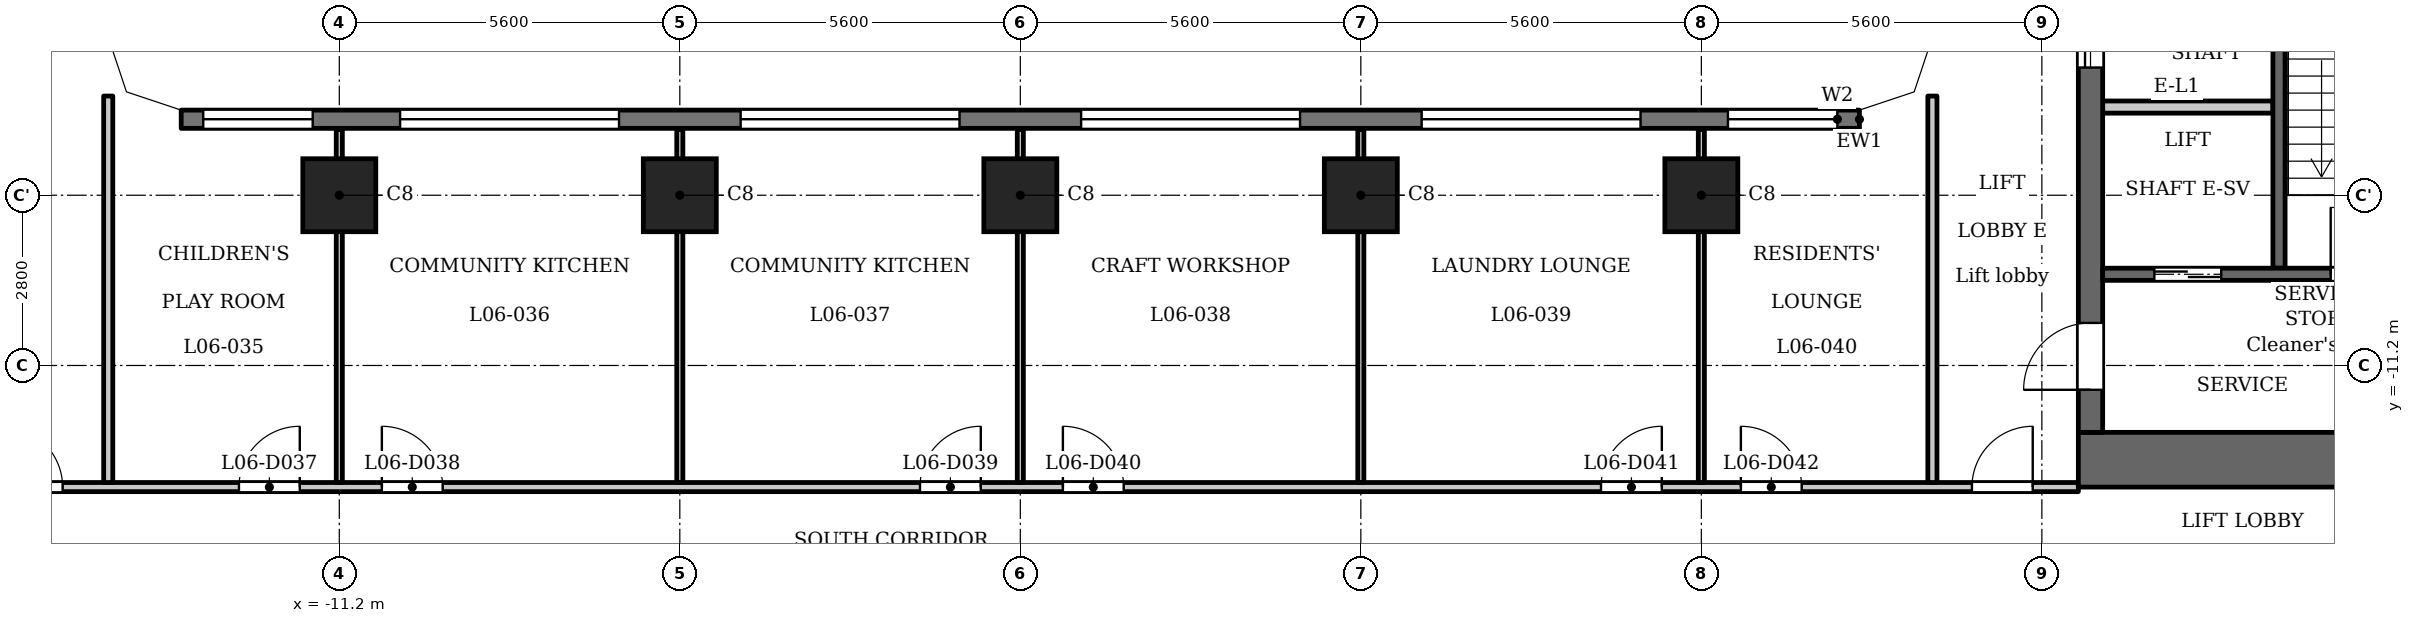
"""IFC4 building model, lengths in metres.
Left out: names, types, materials, properties, quantities, classifications, styles, units other than length and angle.
Written with IfcOpenShell. Run it as: python <this file> out.ifc"""

import sys

from ifc_helpers import new_model, si_unit, direction, frame, frame_2d, origin, origin_2d, place, context, subcontext, project, spatial, polyline, rectangle, outline, extrude, element, fill, save


model = new_model("IFC4")
c1 = context("Model", 3, precision=1e-05, world=origin(), true_north=direction((0.0, 1.0)))
c2 = subcontext(c1, "Body", "Model", "MODEL_VIEW")
j1 = project(units=[si_unit("LENGTHUNIT", "METRE"), si_unit("PLANEANGLEUNIT", "RADIAN")], contexts=[c1])
p1 = place(None, origin())
s1 = spatial("IfcSite", under=j1, at=p1, CompositionType="ELEMENT")
p2 = place(p1, origin())
s2 = spatial("IfcBuilding", under=s1, at=p2, CompositionType="ELEMENT")
p3 = place(p2, frame((0.0, 0.0, 30.5)))
s3 = spatial("IfcBuildingStorey", under=s2, at=p3, CompositionType="ELEMENT", Elevation=30.5)
for number, where, z_axis, x_axis in (
    (1, (-11.2, -8.4, 0.0), (0.0, 0.0, 1.0), (1.0, 0.0, 0.0)),
    (2, (-5.6, -8.4, 0.0), (0.0, 0.0, 1.0), (1.0, 0.0, 0.0)),
    (3, (0.0, -8.4, 0.0), (0.0, 0.0, 1.0), (1.0, 0.0, 0.0)),
    (4, (5.6, -8.4, 0.0), (0.0, 0.0, 1.0), (1.0, 0.0, 0.0)),
    (5, (11.2, -8.4, 0.0), (0.0, 0.0, 1.0), (1.0, 0.0, 0.0)),
):
    element("IfcColumn", number, at=place(p3, frame(where, z_axis=z_axis, x_axis=x_axis)), inside=s3, PredefinedType="COLUMN", context=c2, shape_type="SweptSolid", body=[
        extrude(rectangle(XDim=1.2, YDim=1.2, at=origin_2d()), origin(), (0.0, 0.0, 1.0), 3.5),
    ])
p4 = place(p3, frame((13.8, -7.15, 0.0), z_axis=(0.0, 0.0, 1.0), x_axis=(-1.0, 0.0, 0.0)))
e6 = element("IfcWall", 6, at=p4, inside=s3, PredefinedType="SOLIDWALL", context=c2, shape_type="SweptSolid", body=[
    extrude(rectangle(XDim=27.6, YDim=0.3, at=frame_2d((13.8, 0.0))), origin(), (0.0, 0.0, 1.0), 3.2),
])
p5 = place(p4, frame((0.363, 0.0, 0.9)))
e7 = element("IfcOpeningElement", 7, at=p5, cuts=e6, PredefinedType="OPENING", context=c2, shape_type="SweptSolid", body=[
    extrude(rectangle(XDim=1.8, YDim=1.25, at=frame_2d((0.9, 0.625))), frame((0.0, 0.16, 0.0), z_axis=(0.0, -1.0, 0.0), x_axis=(1.0, 0.0, 0.0)), (0.0, 0.0, 1.0), 0.32),
])
p6 = place(p4, frame((3.6, 0.0, 1.2)))
e8 = element("IfcOpeningElement", 8, at=p6, cuts=e6, PredefinedType="OPENING", context=c2, shape_type="SweptSolid", body=[
    extrude(rectangle(XDim=3.6, YDim=0.95, at=frame_2d((1.8, 0.475))), frame((0.0, 0.16, 0.0), z_axis=(0.0, -1.0, 0.0), x_axis=(1.0, 0.0, 0.0)), (0.0, 0.0, 1.0), 0.32),
])
p7 = place(p4, frame((9.2, 0.0, 1.2)))
e9 = element("IfcOpeningElement", 9, at=p7, cuts=e6, PredefinedType="OPENING", context=c2, shape_type="SweptSolid", body=[
    extrude(rectangle(XDim=3.6, YDim=0.95, at=frame_2d((1.8, 0.475))), frame((0.0, 0.16, 0.0), z_axis=(0.0, -1.0, 0.0), x_axis=(1.0, 0.0, 0.0)), (0.0, 0.0, 1.0), 0.32),
])
p8 = place(p4, frame((14.8, 0.0, 1.2)))
e10 = element("IfcOpeningElement", 10, at=p8, cuts=e6, PredefinedType="OPENING", context=c2, shape_type="SweptSolid", body=[
    extrude(rectangle(XDim=3.6, YDim=0.95, at=frame_2d((1.8, 0.475))), frame((0.0, 0.16, 0.0), z_axis=(0.0, -1.0, 0.0), x_axis=(1.0, 0.0, 0.0)), (0.0, 0.0, 1.0), 0.32),
])
p9 = place(p4, frame((20.4, 0.0, 1.2)))
e11 = element("IfcOpeningElement", 11, at=p9, cuts=e6, PredefinedType="OPENING", context=c2, shape_type="SweptSolid", body=[
    extrude(rectangle(XDim=3.6, YDim=0.95, at=frame_2d((1.8, 0.475))), frame((0.0, 0.16, 0.0), z_axis=(0.0, -1.0, 0.0), x_axis=(1.0, 0.0, 0.0)), (0.0, 0.0, 1.0), 0.32),
])
p10 = place(p4, frame((25.438, 0.0, 0.9)))
e12 = element("IfcOpeningElement", 12, at=p10, cuts=e6, PredefinedType="OPENING", context=c2, shape_type="SweptSolid", body=[
    extrude(rectangle(XDim=1.8, YDim=1.25, at=frame_2d((0.9, 0.625))), frame((0.0, 0.16, 0.0), z_axis=(0.0, -1.0, 0.0), x_axis=(1.0, 0.0, 0.0)), (0.0, 0.0, 1.0), 0.32),
])
p11 = place(p3, frame((20.7, -9.6, 0.0), z_axis=(0.0, 0.0, 1.0), x_axis=(0.0, 1.0, 0.0)))
e13 = element("IfcWall", 13, at=p11, inside=s3, PredefinedType="SHEAR", context=c2, shape_type="SweptSolid", body=[
    extrude(rectangle(XDim=9.75, YDim=0.2, at=frame_2d((4.875, 0.0))), origin(), (0.0, 0.0, 1.0), 3.2),
])
p12 = place(p3, frame((17.4, -12.75, 0.0), z_axis=(0.0, 0.0, 1.0), x_axis=(1.0, 0.0, 0.0)))
e14 = element("IfcWall", 14, at=p12, inside=s3, PredefinedType="SHEAR", context=c2, shape_type="SweptSolid", body=[
    extrude(rectangle(XDim=10.4, YDim=0.9, at=frame_2d((5.2, 0.0))), origin(), (0.0, 0.0, 1.0), 3.2),
])
p13 = place(p3, frame((17.6, -12.3, 0.0), z_axis=(0.0, 0.0, 1.0), x_axis=(0.0, 1.0, 0.0)))
e15 = element("IfcWall", 15, at=p13, inside=s3, PredefinedType="SHEAR", context=c2, shape_type="SweptSolid", body=[
    extrude(rectangle(XDim=24.6, YDim=0.4, at=frame_2d((12.3, 0.0))), origin(), (0.0, 0.0, 1.0), 3.2),
])
p14 = place(p13, frame((6.0, 0.0, 0.0)))
e16 = element("IfcOpeningElement", 16, at=p14, cuts=e15, PredefinedType="OPENING", context=c2, shape_type="SweptSolid", body=[
    extrude(rectangle(XDim=1.1, YDim=2.1, at=frame_2d((0.55, 1.05))), frame((0.0, 0.21, 0.0), z_axis=(0.0, -1.0, 0.0), x_axis=(1.0, 0.0, 0.0)), (0.0, 0.0, 1.0), 0.42),
])
p15 = place(p13, frame((8.4, 0.0, 0.0)))
e17 = element("IfcOpeningElement", 17, at=p15, cuts=e15, PredefinedType="OPENING", context=c2, shape_type="SweptSolid", body=[
    extrude(rectangle(XDim=1.1, YDim=2.1, at=frame_2d((0.55, 1.05))), frame((0.0, 0.21, 0.0), z_axis=(0.0, -1.0, 0.0), x_axis=(1.0, 0.0, 0.0)), (0.0, 0.0, 1.0), 0.42),
])
p16 = place(p13, frame((10.8, 0.0, 0.0)))
e18 = element("IfcOpeningElement", 18, at=p16, cuts=e15, PredefinedType="OPENING", context=c2, shape_type="SweptSolid", body=[
    extrude(rectangle(XDim=1.1, YDim=2.1, at=frame_2d((0.55, 1.05))), frame((0.0, 0.21, 0.0), z_axis=(0.0, -1.0, 0.0), x_axis=(1.0, 0.0, 0.0)), (0.0, 0.0, 1.0), 0.42),
])
p17 = place(p13, frame((16.75, 0.0, 0.0)))
e19 = element("IfcOpeningElement", 19, at=p17, cuts=e15, PredefinedType="OPENING", context=c2, shape_type="SweptSolid", body=[
    extrude(rectangle(XDim=0.9, YDim=2.1, at=frame_2d((0.45, 1.05))), frame((0.0, 0.21, 0.0), z_axis=(0.0, -1.0, 0.0), x_axis=(1.0, 0.0, 0.0)), (0.0, 0.0, 1.0), 0.42),
])
p18 = place(p13, frame((22.8, 0.0, 0.0)))
e20 = element("IfcOpeningElement", 20, at=p18, cuts=e15, PredefinedType="OPENING", context=c2, shape_type="SweptSolid", body=[
    extrude(rectangle(XDim=1.1, YDim=2.1, at=frame_2d((0.55, 1.05))), frame((0.0, 0.21, 0.0), z_axis=(0.0, -1.0, 0.0), x_axis=(1.0, 0.0, 0.0)), (0.0, 0.0, 1.0), 0.42),
])
p19 = place(p13, frame((0.7, 0.0, 0.0)))
e21 = element("IfcOpeningElement", 21, at=p19, cuts=e15, PredefinedType="OPENING", context=c2, shape_type="SweptSolid", body=[
    extrude(rectangle(XDim=1.1, YDim=2.1, at=frame_2d((0.55, 1.05))), frame((0.0, 0.21, 0.0), z_axis=(0.0, -1.0, 0.0), x_axis=(1.0, 0.0, 0.0)), (0.0, 0.0, 1.0), 0.42),
])
p20 = place(p13, frame((12.775, 0.0, 0.0)))
e22 = element("IfcOpeningElement", 22, at=p20, cuts=e15, PredefinedType="OPENING", context=c2, shape_type="SweptSolid", body=[
    extrude(rectangle(XDim=1.8, YDim=2.1, at=frame_2d((0.9, 1.05))), frame((0.0, 0.21, 0.0), z_axis=(0.0, -1.0, 0.0), x_axis=(1.0, 0.0, 0.0)), (0.0, 0.0, 1.0), 0.42),
])
p21 = place(p3, frame((17.8, -9.7, 0.0), z_axis=(0.0, 0.0, 1.0), x_axis=(1.0, 0.0, 0.0)))
e23 = element("IfcWall", 23, at=p21, inside=s3, PredefinedType="SHEAR", context=c2, shape_type="SweptSolid", body=[
    extrude(rectangle(XDim=8.3, YDim=0.2, at=frame_2d((4.15, 0.0))), origin(), (0.0, 0.0, 1.0), 3.2),
])
p22 = place(p21, frame((0.85, 0.0, 0.0)))
e24 = element("IfcOpeningElement", 24, at=p22, cuts=e23, PredefinedType="OPENING", context=c2, shape_type="SweptSolid", body=[
    extrude(rectangle(XDim=1.1, YDim=2.1, at=frame_2d((0.55, 1.05))), frame((0.0, 0.11, 0.0), z_axis=(0.0, -1.0, 0.0), x_axis=(1.0, 0.0, 0.0)), (0.0, 0.0, 1.0), 0.22),
])
p23 = place(p21, frame((3.75, 0.0, 0.0)))
e25 = element("IfcOpeningElement", 25, at=p23, cuts=e23, PredefinedType="OPENING", context=c2, shape_type="SweptSolid", body=[
    extrude(rectangle(XDim=1.1, YDim=2.1, at=frame_2d((0.55, 1.05))), frame((0.0, 0.11, 0.0), z_axis=(0.0, -1.0, 0.0), x_axis=(1.0, 0.0, 0.0)), (0.0, 0.0, 1.0), 0.22),
])
p24 = place(p3, frame((17.8, -6.95, 0.0), z_axis=(0.0, 0.0, 1.0), x_axis=(1.0, 0.0, 0.0)))
e26 = element("IfcWall", 26, at=p24, inside=s3, PredefinedType="PARTITIONING", context=c2, shape_type="SweptSolid", body=[
    extrude(rectangle(XDim=2.8, YDim=0.2, at=frame_2d((1.4, 0.0))), origin(), (0.0, 0.0, 1.0), 3.2),
])
p25 = place(p3, frame((-17.4, -13.2, 0.0), z_axis=(0.0, 0.0, 1.0), x_axis=(1.0, 0.0, 0.0)))
e27 = element("IfcWall", 27, at=p25, inside=s3, PredefinedType="PARTITIONING", context=c2, shape_type="SweptSolid", body=[
    extrude(rectangle(XDim=34.8, YDim=0.15, at=frame_2d((17.4, 0.0))), origin(), (0.0, 0.0, 1.0), 3.2),
])
p26 = place(p25, frame((0.65, 0.0, 0.0)))
e28 = element("IfcOpeningElement", 28, at=p26, cuts=e27, PredefinedType="OPENING", context=c2, shape_type="SweptSolid", body=[
    extrude(rectangle(XDim=1.0, YDim=2.1, at=frame_2d((0.5, 1.05))), frame((0.0, 0.085, 0.0), z_axis=(0.0, -1.0, 0.0), x_axis=(1.0, 0.0, 0.0)), (0.0, 0.0, 1.0), 0.17),
])
p27 = place(p25, frame((33.05, 0.0, 0.0)))
e29 = element("IfcOpeningElement", 29, at=p27, cuts=e27, PredefinedType="OPENING", context=c2, shape_type="SweptSolid", body=[
    extrude(rectangle(XDim=1.0, YDim=2.1, at=frame_2d((0.5, 1.05))), frame((0.0, 0.085, 0.0), z_axis=(0.0, -1.0, 0.0), x_axis=(1.0, 0.0, 0.0)), (0.0, 0.0, 1.0), 0.17),
])
p28 = place(p25, frame((4.55, 0.0, 0.0)))
e30 = element("IfcOpeningElement", 30, at=p28, cuts=e27, PredefinedType="OPENING", context=c2, shape_type="SweptSolid", body=[
    extrude(rectangle(XDim=1.0, YDim=2.1, at=frame_2d((0.5, 1.05))), frame((0.0, 0.085, 0.0), z_axis=(0.0, -1.0, 0.0), x_axis=(1.0, 0.0, 0.0)), (0.0, 0.0, 1.0), 0.17),
])
p29 = place(p25, frame((6.9, 0.0, 0.0)))
e31 = element("IfcOpeningElement", 31, at=p29, cuts=e27, PredefinedType="OPENING", context=c2, shape_type="SweptSolid", body=[
    extrude(rectangle(XDim=1.0, YDim=2.1, at=frame_2d((0.5, 1.05))), frame((0.0, 0.085, 0.0), z_axis=(0.0, -1.0, 0.0), x_axis=(1.0, 0.0, 0.0)), (0.0, 0.0, 1.0), 0.17),
])
p30 = place(p25, frame((15.75, 0.0, 0.0)))
e32 = element("IfcOpeningElement", 32, at=p30, cuts=e27, PredefinedType="OPENING", context=c2, shape_type="SweptSolid", body=[
    extrude(rectangle(XDim=1.0, YDim=2.1, at=frame_2d((0.5, 1.05))), frame((0.0, 0.085, 0.0), z_axis=(0.0, -1.0, 0.0), x_axis=(1.0, 0.0, 0.0)), (0.0, 0.0, 1.0), 0.17),
])
p31 = place(p25, frame((18.1, 0.0, 0.0)))
e33 = element("IfcOpeningElement", 33, at=p31, cuts=e27, PredefinedType="OPENING", context=c2, shape_type="SweptSolid", body=[
    extrude(rectangle(XDim=1.0, YDim=2.1, at=frame_2d((0.5, 1.05))), frame((0.0, 0.085, 0.0), z_axis=(0.0, -1.0, 0.0), x_axis=(1.0, 0.0, 0.0)), (0.0, 0.0, 1.0), 0.17),
])
p32 = place(p25, frame((26.95, 0.0, 0.0)))
e34 = element("IfcOpeningElement", 34, at=p32, cuts=e27, PredefinedType="OPENING", context=c2, shape_type="SweptSolid", body=[
    extrude(rectangle(XDim=1.0, YDim=2.1, at=frame_2d((0.5, 1.05))), frame((0.0, 0.085, 0.0), z_axis=(0.0, -1.0, 0.0), x_axis=(1.0, 0.0, 0.0)), (0.0, 0.0, 1.0), 0.17),
])
p33 = place(p25, frame((29.25, 0.0, 0.0)))
e35 = element("IfcOpeningElement", 35, at=p33, cuts=e27, PredefinedType="OPENING", context=c2, shape_type="SweptSolid", body=[
    extrude(rectangle(XDim=1.0, YDim=2.1, at=frame_2d((0.5, 1.05))), frame((0.0, 0.085, 0.0), z_axis=(0.0, -1.0, 0.0), x_axis=(1.0, 0.0, 0.0)), (0.0, 0.0, 1.0), 0.17),
])
p34 = place(p3, frame((-15.0, -13.125, 0.0), z_axis=(0.0, 0.0, 1.0), x_axis=(0.0, 1.0, 0.0)))
e36 = element("IfcWall", 36, at=p34, inside=s3, PredefinedType="PARTITIONING", context=c2, shape_type="SweptSolid", body=[
    extrude(rectangle(XDim=6.356, YDim=0.15, at=frame_2d((3.178, 0.0))), origin(), (0.0, 0.0, 1.0), 3.2),
])
for number, where, z_axis, x_axis in (
    (37, (-11.2, -13.125, 0.0), (0.0, 0.0, 1.0), (0.0, 1.0, 0.0)),
    (38, (-5.6, -13.125, 0.0), (0.0, 0.0, 1.0), (0.0, 1.0, 0.0)),
    (39, (0.0, -13.125, 0.0), (0.0, 0.0, 1.0), (0.0, 1.0, 0.0)),
    (40, (5.6, -13.125, 0.0), (0.0, 0.0, 1.0), (0.0, 1.0, 0.0)),
    (41, (11.2, -13.125, 0.0), (0.0, 0.0, 1.0), (0.0, 1.0, 0.0)),
):
    element("IfcWall", number, at=place(p3, frame(where, z_axis=z_axis, x_axis=x_axis)), inside=s3, PredefinedType="PARTITIONING", context=c2, shape_type="SweptSolid", body=[
        extrude(rectangle(XDim=5.805, YDim=0.1, at=frame_2d((2.902, 0.0))), origin(), (0.0, 0.0, 1.0), 3.2),
    ])
p35 = place(p3, frame((15.0, -13.125, 0.0), z_axis=(0.0, 0.0, 1.0), x_axis=(0.0, 1.0, 0.0)))
e42 = element("IfcWall", 42, at=p35, inside=s3, PredefinedType="PARTITIONING", context=c2, shape_type="SweptSolid", body=[
    extrude(rectangle(XDim=6.356, YDim=0.15, at=frame_2d((3.178, 0.0))), origin(), (0.0, 0.0, 1.0), 3.2),
])
p36 = place(p3, origin())
e43 = element("IfcWall", 43, at=p36, inside=s3, PredefinedType="SOLIDWALL", context=c2, shape_type="SweptSolid", body=[
    extrude(outline(polyline([(14.937, -6.937), (15.3, -5.849), (15.3, -5.8), (15.0, -5.8), (14.7, -6.7), (13.8, -7.0), (13.8, -7.3), (13.849, -7.3), (14.937, -6.937)])), origin(), (0.0, 0.0, 1.0), 3.2),
])
e44 = element("IfcWall", 44, at=p36, inside=s3, PredefinedType="SOLIDWALL", context=c2, shape_type="SweptSolid", body=[
    extrude(outline(polyline([(-14.937, -6.937), (-13.849, -7.3), (-13.8, -7.3), (-13.8, -7.0), (-14.7, -6.7), (-15.0, -5.8), (-15.3, -5.8), (-15.3, -5.849), (-14.937, -6.937)])), origin(), (0.0, 0.0, 1.0), 3.2),
])
p37 = place(p22, origin())
e45 = element("IfcDoor", 45, at=p37, inside=s3, OperationType="DOUBLE_DOOR_SLIDING", PredefinedType="DOOR", context=c2, shape_type="SweptSolid", body=[
    extrude(rectangle(XDim=1.1, YDim=2.1, at=frame_2d((0.55, 1.05))), frame((0.0, 0.025, 0.0), z_axis=(0.0, -1.0, 0.0), x_axis=(1.0, 0.0, 0.0)), (0.0, 0.0, 1.0), 0.05),
])
fill(e24, e45)
p38 = place(p14, origin())
e46 = element("IfcDoor", 46, at=p38, inside=s3, OperationType="DOUBLE_DOOR_SLIDING", PredefinedType="DOOR", context=c2, shape_type="SweptSolid", body=[
    extrude(rectangle(XDim=1.1, YDim=2.1, at=frame_2d((0.55, 1.05))), frame((0.0, 0.025, 0.0), z_axis=(0.0, -1.0, 0.0), x_axis=(1.0, 0.0, 0.0)), (0.0, 0.0, 1.0), 0.05),
])
fill(e16, e46)
p39 = place(p19, origin())
e47 = element("IfcDoor", 47, at=p39, inside=s3, OperationType="SINGLE_SWING_RIGHT", PredefinedType="DOOR", context=c2, shape_type="SweptSolid", body=[
    extrude(rectangle(XDim=1.1, YDim=2.1, at=frame_2d((0.55, 1.05))), frame((0.0, 0.025, 0.0), z_axis=(0.0, -1.0, 0.0), x_axis=(1.0, 0.0, 0.0)), (0.0, 0.0, 1.0), 0.05),
])
fill(e21, e47)
p40 = place(p23, origin())
e48 = element("IfcDoor", 48, at=p40, inside=s3, OperationType="SINGLE_SWING_RIGHT", PredefinedType="DOOR", context=c2, shape_type="SweptSolid", body=[
    extrude(rectangle(XDim=1.1, YDim=2.1, at=frame_2d((0.55, 1.05))), frame((0.0, 0.025, 0.0), z_axis=(0.0, -1.0, 0.0), x_axis=(1.0, 0.0, 0.0)), (0.0, 0.0, 1.0), 0.05),
])
fill(e25, e48)
p41 = place(p26, origin())
e49 = element("IfcDoor", 49, at=p41, inside=s3, OperationType="SINGLE_SWING_RIGHT", PredefinedType="DOOR", context=c2, shape_type="SweptSolid", body=[
    extrude(rectangle(XDim=1.0, YDim=2.1, at=frame_2d((0.5, 1.05))), frame((0.0, 0.025, 0.0), z_axis=(0.0, -1.0, 0.0), x_axis=(1.0, 0.0, 0.0)), (0.0, 0.0, 1.0), 0.05),
])
fill(e28, e49)
p42 = place(p27, origin())
e50 = element("IfcDoor", 50, at=p42, inside=s3, OperationType="SINGLE_SWING_LEFT", PredefinedType="DOOR", context=c2, shape_type="SweptSolid", body=[
    extrude(rectangle(XDim=1.0, YDim=2.1, at=frame_2d((0.5, 1.05))), frame((0.0, 0.025, 0.0), z_axis=(0.0, -1.0, 0.0), x_axis=(1.0, 0.0, 0.0)), (0.0, 0.0, 1.0), 0.05),
])
fill(e29, e50)
p43 = place(p28, origin())
e51 = element("IfcDoor", 51, at=p43, inside=s3, OperationType="SINGLE_SWING_LEFT", PredefinedType="DOOR", context=c2, shape_type="SweptSolid", body=[
    extrude(rectangle(XDim=1.0, YDim=2.1, at=frame_2d((0.5, 1.05))), frame((0.0, 0.025, 0.0), z_axis=(0.0, -1.0, 0.0), x_axis=(1.0, 0.0, 0.0)), (0.0, 0.0, 1.0), 0.05),
])
fill(e30, e51)
p44 = place(p29, origin())
e52 = element("IfcDoor", 52, at=p44, inside=s3, OperationType="SINGLE_SWING_RIGHT", PredefinedType="DOOR", context=c2, shape_type="SweptSolid", body=[
    extrude(rectangle(XDim=1.0, YDim=2.1, at=frame_2d((0.5, 1.05))), frame((0.0, 0.025, 0.0), z_axis=(0.0, -1.0, 0.0), x_axis=(1.0, 0.0, 0.0)), (0.0, 0.0, 1.0), 0.05),
])
fill(e31, e52)
p45 = place(p30, origin())
e53 = element("IfcDoor", 53, at=p45, inside=s3, OperationType="SINGLE_SWING_LEFT", PredefinedType="DOOR", context=c2, shape_type="SweptSolid", body=[
    extrude(rectangle(XDim=1.0, YDim=2.1, at=frame_2d((0.5, 1.05))), frame((0.0, 0.025, 0.0), z_axis=(0.0, -1.0, 0.0), x_axis=(1.0, 0.0, 0.0)), (0.0, 0.0, 1.0), 0.05),
])
fill(e32, e53)
p46 = place(p31, origin())
e54 = element("IfcDoor", 54, at=p46, inside=s3, OperationType="SINGLE_SWING_RIGHT", PredefinedType="DOOR", context=c2, shape_type="SweptSolid", body=[
    extrude(rectangle(XDim=1.0, YDim=2.1, at=frame_2d((0.5, 1.05))), frame((0.0, 0.025, 0.0), z_axis=(0.0, -1.0, 0.0), x_axis=(1.0, 0.0, 0.0)), (0.0, 0.0, 1.0), 0.05),
])
fill(e33, e54)
p47 = place(p32, origin())
e55 = element("IfcDoor", 55, at=p47, inside=s3, OperationType="SINGLE_SWING_LEFT", PredefinedType="DOOR", context=c2, shape_type="SweptSolid", body=[
    extrude(rectangle(XDim=1.0, YDim=2.1, at=frame_2d((0.5, 1.05))), frame((0.0, 0.025, 0.0), z_axis=(0.0, -1.0, 0.0), x_axis=(1.0, 0.0, 0.0)), (0.0, 0.0, 1.0), 0.05),
])
fill(e34, e55)
p48 = place(p33, origin())
e56 = element("IfcDoor", 56, at=p48, inside=s3, OperationType="SINGLE_SWING_RIGHT", PredefinedType="DOOR", context=c2, shape_type="SweptSolid", body=[
    extrude(rectangle(XDim=1.0, YDim=2.1, at=frame_2d((0.5, 1.05))), frame((0.0, 0.025, 0.0), z_axis=(0.0, -1.0, 0.0), x_axis=(1.0, 0.0, 0.0)), (0.0, 0.0, 1.0), 0.05),
])
fill(e35, e56)
p49 = place(p5, origin())
e57 = element("IfcWindow", 57, at=p49, inside=s3, PartitioningType="SINGLE_PANEL", PredefinedType="WINDOW", context=c2, shape_type="SweptSolid", body=[
    extrude(rectangle(XDim=1.8, YDim=1.25, at=frame_2d((0.9, 0.625))), frame((0.0, 0.03, 0.0), z_axis=(0.0, -1.0, 0.0), x_axis=(1.0, 0.0, 0.0)), (0.0, 0.0, 1.0), 0.06),
])
fill(e7, e57)
p50 = place(p6, origin())
e58 = element("IfcWindow", 58, at=p50, inside=s3, PartitioningType="SINGLE_PANEL", PredefinedType="WINDOW", context=c2, shape_type="SweptSolid", body=[
    extrude(rectangle(XDim=3.6, YDim=0.95, at=frame_2d((1.8, 0.475))), frame((0.0, 0.03, 0.0), z_axis=(0.0, -1.0, 0.0), x_axis=(1.0, 0.0, 0.0)), (0.0, 0.0, 1.0), 0.06),
])
fill(e8, e58)
p51 = place(p7, origin())
e59 = element("IfcWindow", 59, at=p51, inside=s3, PartitioningType="SINGLE_PANEL", PredefinedType="WINDOW", context=c2, shape_type="SweptSolid", body=[
    extrude(rectangle(XDim=3.6, YDim=0.95, at=frame_2d((1.8, 0.475))), frame((0.0, 0.03, 0.0), z_axis=(0.0, -1.0, 0.0), x_axis=(1.0, 0.0, 0.0)), (0.0, 0.0, 1.0), 0.06),
])
fill(e9, e59)
p52 = place(p8, origin())
e60 = element("IfcWindow", 60, at=p52, inside=s3, PartitioningType="SINGLE_PANEL", PredefinedType="WINDOW", context=c2, shape_type="SweptSolid", body=[
    extrude(rectangle(XDim=3.6, YDim=0.95, at=frame_2d((1.8, 0.475))), frame((0.0, 0.03, 0.0), z_axis=(0.0, -1.0, 0.0), x_axis=(1.0, 0.0, 0.0)), (0.0, 0.0, 1.0), 0.06),
])
fill(e10, e60)
p53 = place(p9, origin())
e61 = element("IfcWindow", 61, at=p53, inside=s3, PartitioningType="SINGLE_PANEL", PredefinedType="WINDOW", context=c2, shape_type="SweptSolid", body=[
    extrude(rectangle(XDim=3.6, YDim=0.95, at=frame_2d((1.8, 0.475))), frame((0.0, 0.03, 0.0), z_axis=(0.0, -1.0, 0.0), x_axis=(1.0, 0.0, 0.0)), (0.0, 0.0, 1.0), 0.06),
])
fill(e11, e61)
p54 = place(p10, origin())
e62 = element("IfcWindow", 62, at=p54, inside=s3, PartitioningType="SINGLE_PANEL", PredefinedType="WINDOW", context=c2, shape_type="SweptSolid", body=[
    extrude(rectangle(XDim=1.8, YDim=1.25, at=frame_2d((0.9, 0.625))), frame((0.0, 0.03, 0.0), z_axis=(0.0, -1.0, 0.0), x_axis=(1.0, 0.0, 0.0)), (0.0, 0.0, 1.0), 0.06),
])
fill(e12, e62)
save(model, sys.argv[1])
